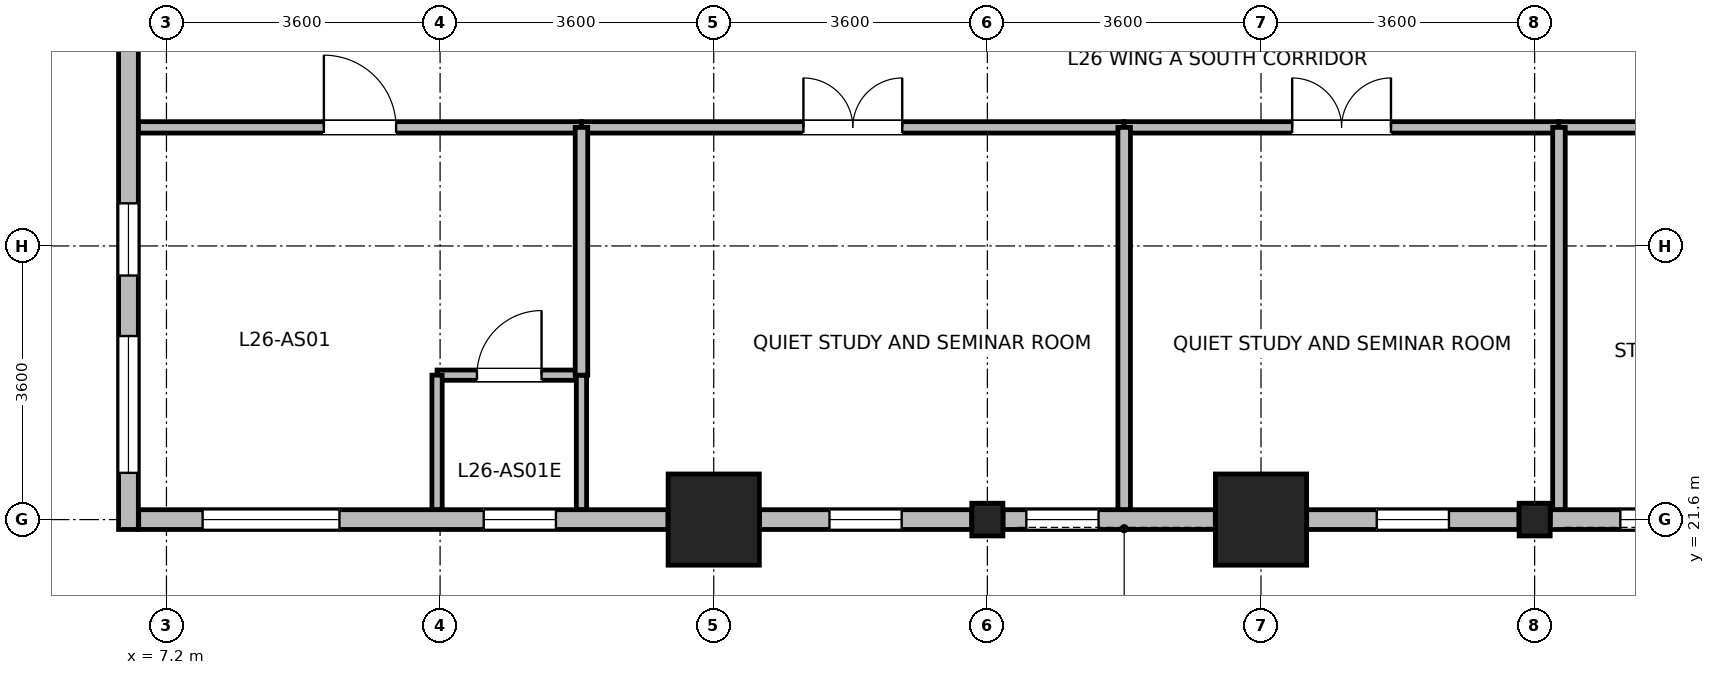
"""IFC4 building model, lengths in metres.
Left out: names, types, materials, properties, quantities, classifications, styles, units other than length and angle.
Written with IfcOpenShell. Run it as: python <this file> out.ifc"""

import sys

from ifc_helpers import new_model, si_unit, direction, frame, frame_2d, origin, origin_2d, place, context, subcontext, project, spatial, rectangle, i_section, extrude, source, transform, mapped, element, fill, save


model = new_model("IFC4")
c1 = context("Model", 3, precision=1e-05, world=origin(), true_north=direction((0.0, 1.0)))
c2 = subcontext(c1, "Body", "Model", "MODEL_VIEW")
j1 = project(units=[si_unit("LENGTHUNIT", "METRE"), si_unit("PLANEANGLEUNIT", "RADIAN")], contexts=[c1])
p1 = place(None, origin())
s1 = spatial("IfcSite", under=j1, at=p1, CompositionType="ELEMENT")
p2 = place(p1, origin())
s2 = spatial("IfcBuilding", under=s1, at=p2, CompositionType="ELEMENT")
p3 = place(p2, frame((0.0, 0.0, 104.5)))
s3 = spatial("IfcBuildingStorey", under=s2, at=p3, CompositionType="ELEMENT", Elevation=104.5)
m1 = source(origin(), c2, "Body", "SweptSolid", [
    extrude(rectangle(XDim=1.2, YDim=1.2, at=origin_2d()), origin(), (0.0, 0.0, 1.0), 3.7),
])
for number, where, z_axis, x_axis in (
    (1, (14.4, 21.6, 0.0), (0.0, 0.0, 1.0), (1.0, 0.0, 0.0)),
    (2, (21.6, 21.6, 0.0), (0.0, 0.0, 1.0), (1.0, 0.0, 0.0)),
):
    element("IfcColumn", number, at=place(p3, frame(where, z_axis=z_axis, x_axis=x_axis)), inside=s3, PredefinedType="COLUMN", context=c2, shape_type="MappedRepresentation", body=[
        mapped(m1, transform((0.0, 0.0, 0.0), x_axis=(1.0, 0.0, 0.0), y_axis=(0.0, 1.0, 0.0), z_axis=(0.0, 0.0, 1.0), scale=1.0)),
    ])
m2 = source(origin(), c2, "Body", "SweptSolid", [
    extrude(i_section(OverallWidth=0.409, OverallDepth=0.43, WebThickness=0.024, FlangeThickness=0.033, FilletRadius=0.015, at=origin_2d()), origin(), (0.0, 0.0, 1.0), 3.7),
])
for number, where, z_axis, x_axis in (
    (3, (18.0, 21.6, 0.0), (0.0, 0.0, 1.0), (1.0, 0.0, 0.0)),
    (4, (25.2, 21.6, 0.0), (0.0, 0.0, 1.0), (1.0, 0.0, 0.0)),
):
    element("IfcColumn", number, at=place(p3, frame(where, z_axis=z_axis, x_axis=x_axis)), inside=s3, PredefinedType="COLUMN", context=c2, shape_type="MappedRepresentation", body=[
        mapped(m2, transform((0.0, 0.0, 0.0), x_axis=(1.0, 0.0, 0.0), y_axis=(0.0, 1.0, 0.0), z_axis=(0.0, 0.0, 1.0), scale=1.0)),
    ])
p4 = place(p3, frame((6.7, 21.47, 0.0), z_axis=(0.0, 0.0, 1.0), x_axis=(0.0, 1.0, 0.0)))
e5 = element("IfcWall", 5, at=p4, inside=s3, PredefinedType="STANDARD", context=c2, shape_type="SweptSolid", body=[
    extrude(rectangle(XDim=6.579, YDim=0.26, at=frame_2d((3.29, 0.0))), origin(), (0.0, 0.0, 1.0), 3.43),
])
p5 = place(p4, frame((0.745, 0.0, 0.85)))
e6 = element("IfcOpeningElement", 6, at=p5, cuts=e5, PredefinedType="OPENING", context=c2, shape_type="SweptSolid", body=[
    extrude(rectangle(XDim=1.8, YDim=1.85, at=frame_2d((0.9, 0.925))), frame((0.0, 0.14, 0.0), z_axis=(0.0, -1.0, 0.0), x_axis=(1.0, 0.0, 0.0)), (0.0, 0.0, 1.0), 0.28),
])
p6 = place(p4, frame((3.341, 0.0, 0.85)))
e7 = element("IfcOpeningElement", 7, at=p6, cuts=e5, PredefinedType="OPENING", context=c2, shape_type="SweptSolid", body=[
    extrude(rectangle(XDim=0.95, YDim=1.75, at=frame_2d((0.475, 0.875))), frame((0.0, 0.14, 0.0), z_axis=(0.0, -1.0, 0.0), x_axis=(1.0, 0.0, 0.0)), (0.0, 0.0, 1.0), 0.28),
])
p7 = place(p3, frame((13.799, 21.6, 0.0), z_axis=(0.0, 0.0, 1.0), x_axis=(-1.0, 0.0, 0.0)))
e8 = element("IfcWall", 8, at=p7, inside=s3, PredefinedType="STANDARD", context=c2, shape_type="SweptSolid", body=[
    extrude(rectangle(XDim=6.964, YDim=0.26, at=frame_2d((3.482, 0.0))), origin(), (0.0, 0.0, 1.0), 3.43),
])
p8 = place(p7, frame((4.323, 0.0, 0.85)))
e9 = element("IfcOpeningElement", 9, at=p8, cuts=e8, PredefinedType="OPENING", context=c2, shape_type="SweptSolid", body=[
    extrude(rectangle(XDim=1.8, YDim=1.85, at=frame_2d((0.9, 0.925))), frame((0.0, 0.14, 0.0), z_axis=(0.0, -1.0, 0.0), x_axis=(1.0, 0.0, 0.0)), (0.0, 0.0, 1.0), 0.28),
])
p9 = place(p7, frame((1.475, 0.0, 0.85)))
e10 = element("IfcOpeningElement", 10, at=p9, cuts=e8, PredefinedType="OPENING", context=c2, shape_type="SweptSolid", body=[
    extrude(rectangle(XDim=0.95, YDim=1.75, at=frame_2d((0.475, 0.875))), frame((0.0, 0.14, 0.0), z_axis=(0.0, -1.0, 0.0), x_axis=(1.0, 0.0, 0.0)), (0.0, 0.0, 1.0), 0.28),
])
p10 = place(p3, frame((17.794, 21.6, 0.0), z_axis=(0.0, 0.0, 1.0), x_axis=(-1.0, 0.0, 0.0)))
e11 = element("IfcWall", 11, at=p10, inside=s3, PredefinedType="STANDARD", context=c2, shape_type="SweptSolid", body=[
    extrude(rectangle(XDim=2.793, YDim=0.26, at=frame_2d((1.397, 0.0))), origin(), (0.0, 0.0, 1.0), 2.98),
])
p11 = place(p10, frame((0.922, 0.0, 0.85)))
e12 = element("IfcOpeningElement", 12, at=p11, cuts=e11, PredefinedType="OPENING", context=c2, shape_type="SweptSolid", body=[
    extrude(rectangle(XDim=0.95, YDim=1.75, at=frame_2d((0.475, 0.875))), frame((0.0, 0.14, 0.0), z_axis=(0.0, -1.0, 0.0), x_axis=(1.0, 0.0, 0.0)), (0.0, 0.0, 1.0), 0.28),
])
p12 = place(p3, frame((20.999, 21.6, 0.0), z_axis=(0.0, 0.0, 1.0), x_axis=(-1.0, 0.0, 0.0)))
e13 = element("IfcWall", 13, at=p12, inside=s3, PredefinedType="STANDARD", context=c2, shape_type="SweptSolid", body=[
    extrude(rectangle(XDim=2.793, YDim=0.26, at=frame_2d((1.397, 0.0))), origin(), (0.0, 0.0, 1.0), 2.98),
])
p13 = place(p12, frame((1.536, 0.0, 0.85)))
e14 = element("IfcOpeningElement", 14, at=p13, cuts=e13, PredefinedType="OPENING", context=c2, shape_type="SweptSolid", body=[
    extrude(rectangle(XDim=0.95, YDim=1.75, at=frame_2d((0.475, 0.875))), frame((0.0, 0.14, 0.0), z_axis=(0.0, -1.0, 0.0), x_axis=(1.0, 0.0, 0.0)), (0.0, 0.0, 1.0), 0.28),
])
p14 = place(p3, frame((24.994, 21.6, 0.0), z_axis=(0.0, 0.0, 1.0), x_axis=(-1.0, 0.0, 0.0)))
e15 = element("IfcWall", 15, at=p14, inside=s3, PredefinedType="STANDARD", context=c2, shape_type="SweptSolid", body=[
    extrude(rectangle(XDim=2.793, YDim=0.26, at=frame_2d((1.397, 0.0))), origin(), (0.0, 0.0, 1.0), 2.98),
])
p15 = place(p14, frame((0.922, 0.0, 0.85)))
e16 = element("IfcOpeningElement", 16, at=p15, cuts=e15, PredefinedType="OPENING", context=c2, shape_type="SweptSolid", body=[
    extrude(rectangle(XDim=0.95, YDim=1.75, at=frame_2d((0.475, 0.875))), frame((0.0, 0.14, 0.0), z_axis=(0.0, -1.0, 0.0), x_axis=(1.0, 0.0, 0.0)), (0.0, 0.0, 1.0), 0.28),
])
p16 = place(p3, frame((28.199, 21.6, 0.0), z_axis=(0.0, 0.0, 1.0), x_axis=(-1.0, 0.0, 0.0)))
e17 = element("IfcWall", 17, at=p16, inside=s3, PredefinedType="STANDARD", context=c2, shape_type="SweptSolid", body=[
    extrude(rectangle(XDim=2.793, YDim=0.26, at=frame_2d((1.397, 0.0))), origin(), (0.0, 0.0, 1.0), 2.98),
])
p17 = place(p16, frame((0.922, 0.0, 0.85)))
e18 = element("IfcOpeningElement", 18, at=p17, cuts=e17, PredefinedType="OPENING", context=c2, shape_type="SweptSolid", body=[
    extrude(rectangle(XDim=0.95, YDim=1.75, at=frame_2d((0.475, 0.875))), frame((0.0, 0.14, 0.0), z_axis=(0.0, -1.0, 0.0), x_axis=(1.0, 0.0, 0.0)), (0.0, 0.0, 1.0), 0.28),
])
p18 = place(p3, frame((10.76, 23.5, 0.0), z_axis=(0.0, 0.0, 1.0), x_axis=(1.0, 0.0, 0.0)))
e19 = element("IfcWall", 19, at=p18, inside=s3, PredefinedType="PARTITIONING", context=c2, shape_type="SweptSolid", body=[
    extrude(rectangle(XDim=1.9, YDim=0.135, at=frame_2d((0.95, 0.0))), origin(), (0.0, 0.0, 1.0), 3.43),
])
p19 = place(p18, frame((0.525, 0.0, 0.0)))
e20 = element("IfcOpeningElement", 20, at=p19, cuts=e19, PredefinedType="OPENING", context=c2, shape_type="SweptSolid", body=[
    extrude(rectangle(XDim=0.85, YDim=2.04, at=frame_2d((0.425, 1.02))), frame((0.0, 0.078, 0.0), z_axis=(0.0, -1.0, 0.0), x_axis=(1.0, 0.0, 0.0)), (0.0, 0.0, 1.0), 0.155),
])
for number, where, z_axis, x_axis in (
    (21, (10.76, 21.732, 0.0), (0.0, 0.0, 1.0), (0.0, 1.0, 0.0)),
    (22, (12.66, 21.732, 0.0), (0.0, 0.0, 1.0), (0.0, 1.0, 0.0)),
):
    element("IfcWall", number, at=place(p3, frame(where, z_axis=z_axis, x_axis=x_axis)), inside=s3, PredefinedType="PARTITIONING", context=c2, shape_type="SweptSolid", body=[
        extrude(rectangle(XDim=1.768, YDim=0.135, at=frame_2d((0.884, 0.0))), origin(), (0.0, 0.0, 1.0), 3.43),
    ])
p20 = place(p3, frame((12.66, 26.76, 0.0), z_axis=(0.0, 0.0, 1.0), x_axis=(1.0, 0.0, 0.0)))
e23 = element("IfcWall", 23, at=p20, inside=s3, PredefinedType="PARTITIONING", context=c2, shape_type="SweptSolid", body=[
    extrude(rectangle(XDim=7.14, YDim=0.15, at=frame_2d((3.57, 0.0))), origin(), (0.0, 0.0, 1.0), 3.43),
])
p21 = place(p20, frame((2.92, 0.0, 0.0)))
e24 = element("IfcOpeningElement", 24, at=p21, cuts=e23, PredefinedType="OPENING", context=c2, shape_type="SweptSolid", body=[
    extrude(rectangle(XDim=1.3, YDim=2.12, at=frame_2d((0.65, 1.06))), frame((0.0, 0.085, 0.0), z_axis=(0.0, -1.0, 0.0), x_axis=(1.0, 0.0, 0.0)), (0.0, 0.0, 1.0), 0.17),
])
p22 = place(p3, frame((6.832, 26.76, 0.0), z_axis=(0.0, 0.0, 1.0), x_axis=(1.0, 0.0, 0.0)))
e25 = element("IfcWall", 25, at=p22, inside=s3, PredefinedType="PARTITIONING", context=c2, shape_type="SweptSolid", body=[
    extrude(rectangle(XDim=5.828, YDim=0.15, at=frame_2d((2.914, 0.0))), origin(), (0.0, 0.0, 1.0), 3.43),
])
p23 = place(p22, frame((2.439, 0.0, 0.0)))
e26 = element("IfcOpeningElement", 26, at=p23, cuts=e25, PredefinedType="OPENING", context=c2, shape_type="SweptSolid", body=[
    extrude(rectangle(XDim=0.95, YDim=2.1, at=frame_2d((0.475, 1.05))), frame((0.0, 0.085, 0.0), z_axis=(0.0, -1.0, 0.0), x_axis=(1.0, 0.0, 0.0)), (0.0, 0.0, 1.0), 0.17),
])
p24 = place(p3, frame((19.8, 26.76, 0.0), z_axis=(0.0, 0.0, 1.0), x_axis=(1.0, 0.0, 0.0)))
e27 = element("IfcWall", 27, at=p24, inside=s3, PredefinedType="PARTITIONING", context=c2, shape_type="SweptSolid", body=[
    extrude(rectangle(XDim=5.72, YDim=0.15, at=frame_2d((2.86, 0.0))), origin(), (0.0, 0.0, 1.0), 3.43),
])
p25 = place(p24, frame((2.21, 0.0, 0.0)))
e28 = element("IfcOpeningElement", 28, at=p25, cuts=e27, PredefinedType="OPENING", context=c2, shape_type="SweptSolid", body=[
    extrude(rectangle(XDim=1.3, YDim=2.12, at=frame_2d((0.65, 1.06))), frame((0.0, 0.085, 0.0), z_axis=(0.0, -1.0, 0.0), x_axis=(1.0, 0.0, 0.0)), (0.0, 0.0, 1.0), 0.17),
])
p26 = place(p3, frame((25.52, 26.76, 0.0), z_axis=(0.0, 0.0, 1.0), x_axis=(1.0, 0.0, 0.0)))
e29 = element("IfcWall", 29, at=p26, inside=s3, PredefinedType="PARTITIONING", context=c2, shape_type="SweptSolid", body=[
    extrude(rectangle(XDim=5.28, YDim=0.15, at=frame_2d((2.64, 0.0))), origin(), (0.0, 0.0, 1.0), 3.43),
])
p27 = place(p26, frame((2.165, 0.0, 0.0)))
e30 = element("IfcOpeningElement", 30, at=p27, cuts=e29, PredefinedType="OPENING", context=c2, shape_type="SweptSolid", body=[
    extrude(rectangle(XDim=0.95, YDim=2.1, at=frame_2d((0.475, 1.05))), frame((0.0, 0.085, 0.0), z_axis=(0.0, -1.0, 0.0), x_axis=(1.0, 0.0, 0.0)), (0.0, 0.0, 1.0), 0.17),
])
for number, where, z_axis, x_axis in (
    (31, (19.8, 21.732, 0.0), (0.0, 0.0, 1.0), (0.0, 1.0, 0.0)),
    (32, (25.52, 21.732, 0.0), (0.0, 0.0, 1.0), (0.0, 1.0, 0.0)),
):
    element("IfcWall", number, at=place(p3, frame(where, z_axis=z_axis, x_axis=x_axis)), inside=s3, PredefinedType="PARTITIONING", context=c2, shape_type="SweptSolid", body=[
        extrude(rectangle(XDim=5.028, YDim=0.165, at=frame_2d((2.514, 0.0))), origin(), (0.0, 0.0, 1.0), 3.43),
    ])
p28 = place(p3, frame((12.66, 23.5, 0.0), z_axis=(0.0, 0.0, 1.0), x_axis=(0.0, 1.0, 0.0)))
e33 = element("IfcWall", 33, at=p28, inside=s3, PredefinedType="PARTITIONING", context=c2, shape_type="SweptSolid", body=[
    extrude(rectangle(XDim=3.26, YDim=0.165, at=frame_2d((1.63, 0.0))), origin(), (0.0, 0.0, 1.0), 3.43),
])
p29 = place(p5, origin())
e34 = element("IfcWindow", 34, at=p29, inside=s3, PartitioningType="SINGLE_PANEL", PredefinedType="WINDOW", context=c2, shape_type="SweptSolid", body=[
    extrude(rectangle(XDim=1.8, YDim=1.85, at=frame_2d((0.9, 0.925))), frame((0.0, 0.03, 0.0), z_axis=(0.0, -1.0, 0.0), x_axis=(1.0, 0.0, 0.0)), (0.0, 0.0, 1.0), 0.06),
])
fill(e6, e34)
p30 = place(p6, origin())
e35 = element("IfcWindow", 35, at=p30, inside=s3, PartitioningType="SINGLE_PANEL", PredefinedType="WINDOW", context=c2, shape_type="SweptSolid", body=[
    extrude(rectangle(XDim=0.95, YDim=1.75, at=frame_2d((0.475, 0.875))), frame((0.0, 0.03, 0.0), z_axis=(0.0, -1.0, 0.0), x_axis=(1.0, 0.0, 0.0)), (0.0, 0.0, 1.0), 0.06),
])
fill(e7, e35)
p31 = place(p8, origin())
e36 = element("IfcWindow", 36, at=p31, inside=s3, PartitioningType="SINGLE_PANEL", PredefinedType="WINDOW", context=c2, shape_type="SweptSolid", body=[
    extrude(rectangle(XDim=1.8, YDim=1.85, at=frame_2d((0.9, 0.925))), frame((0.0, 0.03, 0.0), z_axis=(0.0, -1.0, 0.0), x_axis=(1.0, 0.0, 0.0)), (0.0, 0.0, 1.0), 0.06),
])
fill(e9, e36)
p32 = place(p9, origin())
e37 = element("IfcWindow", 37, at=p32, inside=s3, PartitioningType="SINGLE_PANEL", PredefinedType="WINDOW", context=c2, shape_type="SweptSolid", body=[
    extrude(rectangle(XDim=0.95, YDim=1.75, at=frame_2d((0.475, 0.875))), frame((0.0, 0.03, 0.0), z_axis=(0.0, -1.0, 0.0), x_axis=(1.0, 0.0, 0.0)), (0.0, 0.0, 1.0), 0.06),
])
fill(e10, e37)
p33 = place(p11, origin())
e38 = element("IfcWindow", 38, at=p33, inside=s3, PartitioningType="SINGLE_PANEL", PredefinedType="WINDOW", context=c2, shape_type="SweptSolid", body=[
    extrude(rectangle(XDim=0.95, YDim=1.75, at=frame_2d((0.475, 0.875))), frame((0.0, 0.03, 0.0), z_axis=(0.0, -1.0, 0.0), x_axis=(1.0, 0.0, 0.0)), (0.0, 0.0, 1.0), 0.06),
])
fill(e12, e38)
p34 = place(p13, origin())
e39 = element("IfcWindow", 39, at=p34, inside=s3, PartitioningType="SINGLE_PANEL", PredefinedType="WINDOW", context=c2, shape_type="SweptSolid", body=[
    extrude(rectangle(XDim=0.95, YDim=1.75, at=frame_2d((0.475, 0.875))), frame((0.0, 0.03, 0.0), z_axis=(0.0, -1.0, 0.0), x_axis=(1.0, 0.0, 0.0)), (0.0, 0.0, 1.0), 0.06),
])
fill(e14, e39)
p35 = place(p15, origin())
e40 = element("IfcWindow", 40, at=p35, inside=s3, PartitioningType="SINGLE_PANEL", PredefinedType="WINDOW", context=c2, shape_type="SweptSolid", body=[
    extrude(rectangle(XDim=0.95, YDim=1.75, at=frame_2d((0.475, 0.875))), frame((0.0, 0.03, 0.0), z_axis=(0.0, -1.0, 0.0), x_axis=(1.0, 0.0, 0.0)), (0.0, 0.0, 1.0), 0.06),
])
fill(e16, e40)
p36 = place(p17, origin())
e41 = element("IfcWindow", 41, at=p36, inside=s3, PartitioningType="SINGLE_PANEL", PredefinedType="WINDOW", context=c2, shape_type="SweptSolid", body=[
    extrude(rectangle(XDim=0.95, YDim=1.75, at=frame_2d((0.475, 0.875))), frame((0.0, 0.03, 0.0), z_axis=(0.0, -1.0, 0.0), x_axis=(1.0, 0.0, 0.0)), (0.0, 0.0, 1.0), 0.06),
])
fill(e18, e41)
p37 = place(p19, origin())
e42 = element("IfcDoor", 42, at=p37, inside=s3, OperationType="SINGLE_SWING_RIGHT", PredefinedType="DOOR", context=c2, shape_type="SweptSolid", body=[
    extrude(rectangle(XDim=0.85, YDim=2.04, at=frame_2d((0.425, 1.02))), frame((0.0, 0.025, 0.0), z_axis=(0.0, -1.0, 0.0), x_axis=(1.0, 0.0, 0.0)), (0.0, 0.0, 1.0), 0.05),
])
fill(e20, e42)
p38 = place(p21, origin())
e43 = element("IfcDoor", 43, at=p38, inside=s3, OperationType="DOUBLE_DOOR_SINGLE_SWING", PredefinedType="DOOR", context=c2, shape_type="SweptSolid", body=[
    extrude(rectangle(XDim=1.3, YDim=2.12, at=frame_2d((0.65, 1.06))), frame((0.0, 0.025, 0.0), z_axis=(0.0, -1.0, 0.0), x_axis=(1.0, 0.0, 0.0)), (0.0, 0.0, 1.0), 0.05),
])
fill(e24, e43)
p39 = place(p23, origin())
e44 = element("IfcDoor", 44, at=p39, inside=s3, OperationType="SINGLE_SWING_LEFT", PredefinedType="DOOR", context=c2, shape_type="SweptSolid", body=[
    extrude(rectangle(XDim=0.95, YDim=2.1, at=frame_2d((0.475, 1.05))), frame((0.0, 0.025, 0.0), z_axis=(0.0, -1.0, 0.0), x_axis=(1.0, 0.0, 0.0)), (0.0, 0.0, 1.0), 0.05),
])
fill(e26, e44)
p40 = place(p25, origin())
e45 = element("IfcDoor", 45, at=p40, inside=s3, OperationType="DOUBLE_DOOR_SINGLE_SWING", PredefinedType="DOOR", context=c2, shape_type="SweptSolid", body=[
    extrude(rectangle(XDim=1.3, YDim=2.12, at=frame_2d((0.65, 1.06))), frame((0.0, 0.025, 0.0), z_axis=(0.0, -1.0, 0.0), x_axis=(1.0, 0.0, 0.0)), (0.0, 0.0, 1.0), 0.05),
])
fill(e28, e45)
save(model, sys.argv[1])
